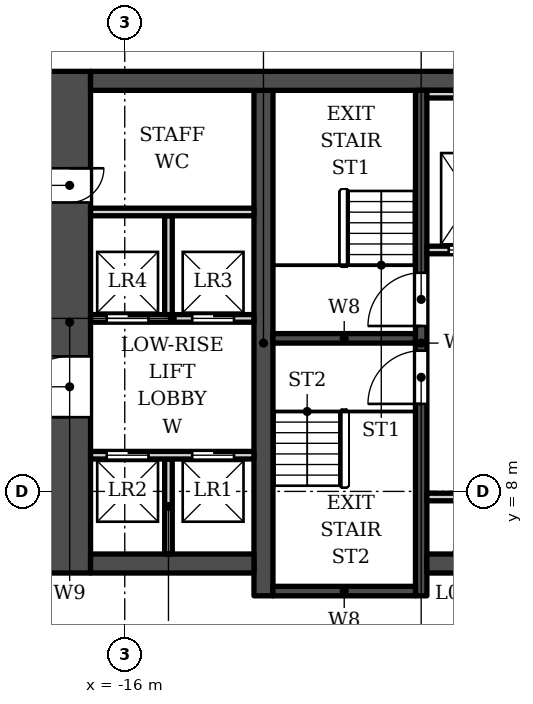
"""IFC4 building model, lengths in metres.
Left out: names, types, materials, properties, quantities, classifications, styles, units other than length and angle.
Written with IfcOpenShell. Run it as: python <this file> out.ifc"""

import sys

from ifc_helpers import new_model, si_unit, direction, frame, frame_2d, origin, place, context, subcontext, project, spatial, rectangle, extrude, element, fill, save


model = new_model("IFC4")
c1 = context("Model", 3, precision=1e-05, world=origin(), true_north=direction((0.0, 1.0)))
c2 = subcontext(c1, "Body", "Model", "MODEL_VIEW")
j1 = project(units=[si_unit("LENGTHUNIT", "METRE"), si_unit("PLANEANGLEUNIT", "RADIAN")], contexts=[c1])
p1 = place(None, origin())
s1 = spatial("IfcSite", under=j1, at=p1, CompositionType="ELEMENT")
p2 = place(p1, origin())
s2 = spatial("IfcBuilding", under=s1, at=p2, CompositionType="ELEMENT")
p3 = place(p2, frame((0.0, 0.0, 29.0)))
s3 = spatial("IfcBuildingStorey", under=s2, at=p3, CompositionType="ELEMENT", Elevation=29.0)
p4 = place(p3, frame((-16.9, 18.802, 0.0), z_axis=(0.0, 0.0, 1.0), x_axis=(1.0, 0.0, 0.0)))
e1 = element("IfcWall", 1, at=p4, inside=s3, PredefinedType="SHEAR", context=c2, shape_type="SweptSolid", body=[
    extrude(rectangle(XDim=33.8, YDim=0.5, at=frame_2d((16.9, 0.0))), origin(), (0.0, 0.0, 1.0), 5.5),
])
p5 = place(p3, frame((-12.35, 5.253, 0.0), z_axis=(0.0, 0.0, 1.0), x_axis=(0.0, 1.0, 0.0)))
e2 = element("IfcWall", 2, at=p5, inside=s3, PredefinedType="SHEAR", context=c2, shape_type="SweptSolid", body=[
    extrude(rectangle(XDim=13.3, YDim=0.5, at=frame_2d((6.65, 0.0))), origin(), (0.0, 0.0, 1.0), 5.5),
])
p6 = place(p3, frame((-8.2, 5.253, 0.0), z_axis=(0.0, 0.0, 1.0), x_axis=(0.0, 1.0, 0.0)))
e3 = element("IfcWall", 3, at=p6, inside=s3, PredefinedType="SHEAR", context=c2, shape_type="SweptSolid", body=[
    extrude(rectangle(XDim=13.3, YDim=0.3, at=frame_2d((6.65, 0.0))), origin(), (0.0, 0.0, 1.0), 5.5),
])
p7 = place(p6, frame((7.1, 0.0, 0.0)))
e4 = element("IfcOpeningElement", 4, at=p7, cuts=e3, PredefinedType="OPENING", context=c2, shape_type="SweptSolid", body=[
    extrude(rectangle(XDim=1.4, YDim=2.1, at=frame_2d((0.7, 1.05))), frame((0.0, 0.16, 0.0), z_axis=(0.0, -1.0, 0.0), x_axis=(1.0, 0.0, 0.0)), (0.0, 0.0, 1.0), 0.32),
])
p8 = place(p6, frame((5.05, 0.0, 0.0)))
e5 = element("IfcOpeningElement", 5, at=p8, cuts=e3, PredefinedType="OPENING", context=c2, shape_type="SweptSolid", body=[
    extrude(rectangle(XDim=1.4, YDim=2.1, at=frame_2d((0.7, 1.05))), frame((0.0, 0.16, 0.0), z_axis=(0.0, -1.0, 0.0), x_axis=(1.0, 0.0, 0.0)), (0.0, 0.0, 1.0), 0.32),
])
for number, where, z_axis, x_axis in (
    (6, (-12.1, 12.028, 0.0), (0.0, 0.0, 1.0), (1.0, 0.0, 0.0)),
    (7, (-12.1, 5.378, 0.0), (0.0, 0.0, 1.0), (1.0, 0.0, 0.0)),
):
    element("IfcWall", number, at=place(p3, frame(where, z_axis=z_axis, x_axis=x_axis)), inside=s3, PredefinedType="SHEAR", context=c2, shape_type="SweptSolid", body=[
        extrude(rectangle(XDim=3.75, YDim=0.25, at=frame_2d((1.875, 0.0))), origin(), (0.0, 0.0, 1.0), 5.5),
    ])
p9 = place(p3, frame((-8.05, 6.103, 0.0), z_axis=(0.0, 0.0, 1.0), x_axis=(1.0, 0.0, 0.0)))
e8 = element("IfcWall", 8, at=p9, inside=s3, PredefinedType="SHEAR", context=c2, shape_type="SweptSolid", body=[
    extrude(rectangle(XDim=7.05, YDim=0.5, at=frame_2d((3.525, 0.0))), origin(), (0.0, 0.0, 1.0), 5.5),
])
p10 = place(p9, frame((0.825, 0.0, 0.0)))
e9 = element("IfcOpeningElement", 9, at=p10, cuts=e8, PredefinedType="OPENING", context=c2, shape_type="SweptSolid", body=[
    extrude(rectangle(XDim=0.9, YDim=2.1, at=frame_2d((0.45, 1.05))), frame((0.0, 0.26, 0.0), z_axis=(0.0, -1.0, 0.0), x_axis=(1.0, 0.0, 0.0)), (0.0, 0.0, 1.0), 0.52),
])
p11 = place(p3, frame((-12.6, 6.103, 0.0), z_axis=(0.0, 0.0, 1.0), x_axis=(-1.0, 0.0, 0.0)))
e10 = element("IfcWall", 10, at=p11, inside=s3, PredefinedType="SHEAR", context=c2, shape_type="SweptSolid", body=[
    extrude(rectangle(XDim=4.3, YDim=0.5, at=frame_2d((2.15, 0.0))), origin(), (0.0, 0.0, 1.0), 5.5),
])
p12 = place(p3, frame((-17.45, 5.853, 0.0), z_axis=(0.0, 0.0, 1.0), x_axis=(0.0, 1.0, 0.0)))
e11 = element("IfcWall", 11, at=p12, inside=s3, PredefinedType="SHEAR", context=c2, shape_type="SweptSolid", body=[
    extrude(rectangle(XDim=13.2, YDim=1.1, at=frame_2d((6.6, 0.0))), origin(), (0.0, 0.0, 1.0), 5.5),
])
p13 = place(p12, frame((4.1, 0.0, 0.0)))
e12 = element("IfcOpeningElement", 12, at=p13, cuts=e11, PredefinedType="OPENING", context=c2, shape_type="SweptSolid", body=[
    extrude(rectangle(XDim=1.6, YDim=2.1, at=frame_2d((0.8, 1.05))), frame((0.0, 0.56, 0.0), z_axis=(0.0, -1.0, 0.0), x_axis=(1.0, 0.0, 0.0)), (0.0, 0.0, 1.0), 1.12),
])
p14 = place(p12, frame((9.75, 0.0, 0.0)))
e13 = element("IfcOpeningElement", 13, at=p14, cuts=e11, PredefinedType="OPENING", context=c2, shape_type="SweptSolid", body=[
    extrude(rectangle(XDim=0.9, YDim=2.1, at=frame_2d((0.45, 1.05))), frame((0.0, 0.56, 0.0), z_axis=(0.0, -1.0, 0.0), x_axis=(1.0, 0.0, 0.0)), (0.0, 0.0, 1.0), 1.12),
])
for number, where, z_axis, x_axis in (
    (14, (-14.85, 6.353, 0.0), (0.0, 0.0, 1.0), (0.0, 1.0, 0.0)),
    (15, (-8.05, 7.853, 0.0), (0.0, 0.0, 1.0), (1.0, 0.0, 0.0)),
):
    element("IfcWall", number, at=place(p3, frame(where, z_axis=z_axis, x_axis=x_axis)), inside=s3, PredefinedType="SOLIDWALL", context=c2, shape_type="SweptSolid", body=[
        extrude(rectangle(XDim=2.5, YDim=0.2, at=frame_2d((1.25, 0.0))), origin(), (0.0, 0.0, 1.0), 5.05),
    ])
p15 = place(p3, frame((-16.9, 8.953, 0.0), z_axis=(0.0, 0.0, 1.0), x_axis=(1.0, 0.0, 0.0)))
e16 = element("IfcWall", 16, at=p15, inside=s3, PredefinedType="SOLIDWALL", context=c2, shape_type="SweptSolid", body=[
    extrude(rectangle(XDim=4.3, YDim=0.2, at=frame_2d((2.15, 0.0))), origin(), (0.0, 0.0, 1.0), 5.05),
])
p16 = place(p15, frame((2.675, 0.0, 0.0)))
e17 = element("IfcOpeningElement", 17, at=p16, cuts=e16, PredefinedType="OPENING", context=c2, shape_type="SweptSolid", body=[
    extrude(rectangle(XDim=1.1, YDim=2.1, at=frame_2d((0.55, 1.05))), frame((0.0, 0.11, 0.0), z_axis=(0.0, -1.0, 0.0), x_axis=(1.0, 0.0, 0.0)), (0.0, 0.0, 1.0), 0.22),
])
p17 = place(p15, frame((0.425, 0.0, 0.0)))
e18 = element("IfcOpeningElement", 18, at=p17, cuts=e16, PredefinedType="OPENING", context=c2, shape_type="SweptSolid", body=[
    extrude(rectangle(XDim=1.1, YDim=2.1, at=frame_2d((0.55, 1.05))), frame((0.0, 0.11, 0.0), z_axis=(0.0, -1.0, 0.0), x_axis=(1.0, 0.0, 0.0)), (0.0, 0.0, 1.0), 0.22),
])
p18 = place(p3, frame((-16.9, 12.552, 0.0), z_axis=(0.0, 0.0, 1.0), x_axis=(1.0, 0.0, 0.0)))
e19 = element("IfcWall", 19, at=p18, inside=s3, PredefinedType="SOLIDWALL", context=c2, shape_type="SweptSolid", body=[
    extrude(rectangle(XDim=4.3, YDim=0.2, at=frame_2d((2.15, 0.0))), origin(), (0.0, 0.0, 1.0), 5.05),
])
p19 = place(p18, frame((2.675, 0.0, 0.0)))
e20 = element("IfcOpeningElement", 20, at=p19, cuts=e19, PredefinedType="OPENING", context=c2, shape_type="SweptSolid", body=[
    extrude(rectangle(XDim=1.1, YDim=2.1, at=frame_2d((0.55, 1.05))), frame((0.0, 0.11, 0.0), z_axis=(0.0, -1.0, 0.0), x_axis=(1.0, 0.0, 0.0)), (0.0, 0.0, 1.0), 0.22),
])
p20 = place(p18, frame((0.425, 0.0, 0.0)))
e21 = element("IfcOpeningElement", 21, at=p20, cuts=e19, PredefinedType="OPENING", context=c2, shape_type="SweptSolid", body=[
    extrude(rectangle(XDim=1.1, YDim=2.1, at=frame_2d((0.55, 1.05))), frame((0.0, 0.11, 0.0), z_axis=(0.0, -1.0, 0.0), x_axis=(1.0, 0.0, 0.0)), (0.0, 0.0, 1.0), 0.22),
])
p21 = place(p3, frame((-14.85, 12.653, 0.0), z_axis=(0.0, 0.0, 1.0), x_axis=(0.0, 1.0, 0.0)))
e22 = element("IfcWall", 22, at=p21, inside=s3, PredefinedType="SOLIDWALL", context=c2, shape_type="SweptSolid", body=[
    extrude(rectangle(XDim=2.6, YDim=0.2, at=frame_2d((1.3, 0.0))), origin(), (0.0, 0.0, 1.0), 5.05),
])
p22 = place(p3, frame((-8.05, 14.353, 0.0), z_axis=(0.0, 0.0, 1.0), x_axis=(1.0, 0.0, 0.0)))
e23 = element("IfcWall", 23, at=p22, inside=s3, PredefinedType="SOLIDWALL", context=c2, shape_type="SweptSolid", body=[
    extrude(rectangle(XDim=2.35, YDim=0.2, at=frame_2d((1.175, 0.0))), origin(), (0.0, 0.0, 1.0), 5.05),
])
p23 = place(p22, frame((0.575, 0.0, 0.0)))
e24 = element("IfcOpeningElement", 24, at=p23, cuts=e23, PredefinedType="OPENING", context=c2, shape_type="SweptSolid", body=[
    extrude(rectangle(XDim=1.2, YDim=2.1, at=frame_2d((0.6, 1.05))), frame((0.0, 0.11, 0.0), z_axis=(0.0, -1.0, 0.0), x_axis=(1.0, 0.0, 0.0)), (0.0, 0.0, 1.0), 0.22),
])
p24 = place(p3, frame((-16.9, 15.353, 0.0), z_axis=(0.0, 0.0, 1.0), x_axis=(1.0, 0.0, 0.0)))
e25 = element("IfcWall", 25, at=p24, inside=s3, PredefinedType="SOLIDWALL", context=c2, shape_type="SweptSolid", body=[
    extrude(rectangle(XDim=4.3, YDim=0.2, at=frame_2d((2.15, 0.0))), origin(), (0.0, 0.0, 1.0), 5.05),
])
p25 = place(p3, frame((-8.05, 18.453, 0.0), z_axis=(0.0, 0.0, 1.0), x_axis=(1.0, 0.0, 0.0)))
e26 = element("IfcWall", 26, at=p25, inside=s3, PredefinedType="SOLIDWALL", context=c2, shape_type="SweptSolid", body=[
    extrude(rectangle(XDim=2.35, YDim=0.2, at=frame_2d((1.175, 0.0))), origin(), (0.0, 0.0, 1.0), 5.05),
])
p26 = place(p23, origin())
e27 = element("IfcDoor", 27, at=p26, inside=s3, OperationType="DOUBLE_DOOR_SLIDING", PredefinedType="DOOR", context=c2, shape_type="SweptSolid", body=[
    extrude(rectangle(XDim=1.2, YDim=2.1, at=frame_2d((0.6, 1.05))), frame((0.0, 0.025, 0.0), z_axis=(0.0, -1.0, 0.0), x_axis=(1.0, 0.0, 0.0)), (0.0, 0.0, 1.0), 0.05),
])
fill(e24, e27)
p27 = place(p16, origin())
e28 = element("IfcDoor", 28, at=p27, inside=s3, OperationType="DOUBLE_DOOR_SLIDING", PredefinedType="DOOR", context=c2, shape_type="SweptSolid", body=[
    extrude(rectangle(XDim=1.1, YDim=2.1, at=frame_2d((0.55, 1.05))), frame((0.0, 0.025, 0.0), z_axis=(0.0, -1.0, 0.0), x_axis=(1.0, 0.0, 0.0)), (0.0, 0.0, 1.0), 0.05),
])
fill(e17, e28)
p28 = place(p19, origin())
e29 = element("IfcDoor", 29, at=p28, inside=s3, OperationType="DOUBLE_DOOR_SLIDING", PredefinedType="DOOR", context=c2, shape_type="SweptSolid", body=[
    extrude(rectangle(XDim=1.1, YDim=2.1, at=frame_2d((0.55, 1.05))), frame((0.0, 0.025, 0.0), z_axis=(0.0, -1.0, 0.0), x_axis=(1.0, 0.0, 0.0)), (0.0, 0.0, 1.0), 0.05),
])
fill(e20, e29)
p29 = place(p17, origin())
e30 = element("IfcDoor", 30, at=p29, inside=s3, OperationType="DOUBLE_DOOR_SLIDING", PredefinedType="DOOR", context=c2, shape_type="SweptSolid", body=[
    extrude(rectangle(XDim=1.1, YDim=2.1, at=frame_2d((0.55, 1.05))), frame((0.0, 0.025, 0.0), z_axis=(0.0, -1.0, 0.0), x_axis=(1.0, 0.0, 0.0)), (0.0, 0.0, 1.0), 0.05),
])
fill(e18, e30)
p30 = place(p20, origin())
e31 = element("IfcDoor", 31, at=p30, inside=s3, OperationType="DOUBLE_DOOR_SLIDING", PredefinedType="DOOR", context=c2, shape_type="SweptSolid", body=[
    extrude(rectangle(XDim=1.1, YDim=2.1, at=frame_2d((0.55, 1.05))), frame((0.0, 0.025, 0.0), z_axis=(0.0, -1.0, 0.0), x_axis=(1.0, 0.0, 0.0)), (0.0, 0.0, 1.0), 0.05),
])
fill(e21, e31)
p31 = place(p7, origin())
e32 = element("IfcDoor", 32, at=p31, inside=s3, OperationType="SINGLE_SWING_LEFT", PredefinedType="DOOR", context=c2, shape_type="SweptSolid", body=[
    extrude(rectangle(XDim=1.4, YDim=2.1, at=frame_2d((0.7, 1.05))), frame((0.0, 0.025, 0.0), z_axis=(0.0, -1.0, 0.0), x_axis=(1.0, 0.0, 0.0)), (0.0, 0.0, 1.0), 0.05),
])
fill(e4, e32)
p32 = place(p8, origin())
e33 = element("IfcDoor", 33, at=p32, inside=s3, OperationType="SINGLE_SWING_LEFT", PredefinedType="DOOR", context=c2, shape_type="SweptSolid", body=[
    extrude(rectangle(XDim=1.4, YDim=2.1, at=frame_2d((0.7, 1.05))), frame((0.0, 0.025, 0.0), z_axis=(0.0, -1.0, 0.0), x_axis=(1.0, 0.0, 0.0)), (0.0, 0.0, 1.0), 0.05),
])
fill(e5, e33)
p33 = place(p13, origin())
e34 = element("IfcDoor", 34, at=p33, inside=s3, OperationType="DOUBLE_DOOR_SINGLE_SWING", PredefinedType="DOOR", context=c2, shape_type="SweptSolid", body=[
    extrude(rectangle(XDim=1.6, YDim=2.1, at=frame_2d((0.8, 1.05))), frame((0.0, -0.225, 0.0), z_axis=(0.0, -1.0, 0.0), x_axis=(1.0, 0.0, 0.0)), (0.0, 0.0, 1.0), 0.05),
])
fill(e12, e34)
p34 = place(p14, origin())
e35 = element("IfcDoor", 35, at=p34, inside=s3, OperationType="SINGLE_SWING_RIGHT", PredefinedType="DOOR", context=c2, shape_type="SweptSolid", body=[
    extrude(rectangle(XDim=0.9, YDim=2.1, at=frame_2d((0.45, 1.05))), frame((0.0, -0.225, 0.0), z_axis=(0.0, -1.0, 0.0), x_axis=(1.0, 0.0, 0.0)), (0.0, 0.0, 1.0), 0.05),
])
fill(e13, e35)
save(model, sys.argv[1])
